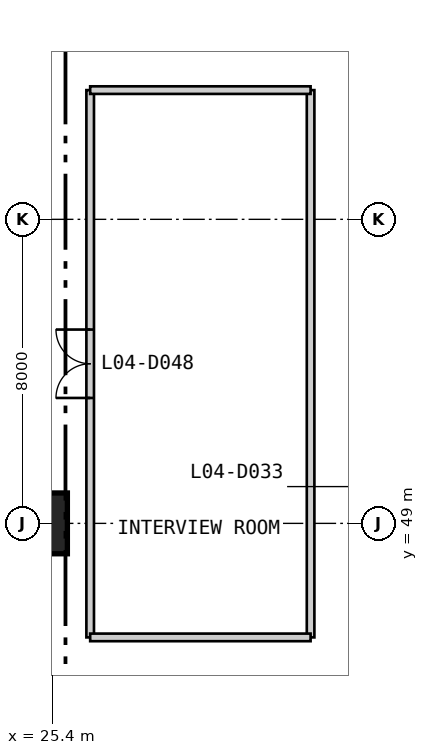
"""IFC4 building model, lengths in metres.
Left out: names, types, materials, properties, quantities, classifications, styles, units other than length and angle.
Written with IfcOpenShell. Run it as: python <this file> out.ifc"""

import sys

from ifc_helpers import new_model, si_unit, direction, frame, frame_2d, origin, origin_2d, place, context, subcontext, project, spatial, rectangle, extrude, element, fill, save


model = new_model("IFC4")
c1 = context("Model", 3, precision=1e-05, world=origin(), true_north=direction((0.0, 1.0)))
c2 = subcontext(c1, "Body", "Model", "MODEL_VIEW")
j1 = project(units=[si_unit("LENGTHUNIT", "METRE"), si_unit("PLANEANGLEUNIT", "RADIAN")], contexts=[c1])
p1 = place(None, origin())
s1 = spatial("IfcSite", under=j1, at=p1, CompositionType="ELEMENT")
p2 = place(p1, origin())
s2 = spatial("IfcBuilding", under=s1, at=p2, CompositionType="ELEMENT")
p3 = place(p2, frame((0.0, 0.0, 21.4)))
s3 = spatial("IfcBuildingStorey", under=s2, at=p3, CompositionType="ELEMENT", Elevation=21.4)
p4 = place(p3, frame((25.0, 49.0, 0.0), z_axis=(0.0, 0.0, 1.0), x_axis=(1.0, 0.0, 0.0)))
e1 = element("IfcColumn", 1, at=p4, inside=s3, PredefinedType="COLUMN", context=c2, shape_type="SweptSolid", body=[
    extrude(rectangle(XDim=1.6, YDim=1.6, at=origin_2d()), origin(), (0.0, 0.0, 1.0), 4.8),
])
p5 = place(p3, frame((26.4, 46.0, 0.0), z_axis=(0.0, 0.0, 1.0), x_axis=(0.0, 1.0, 0.0)))
e2 = element("IfcWall", 2, at=p5, inside=s3, PredefinedType="PARTITIONING", context=c2, shape_type="SweptSolid", body=[
    extrude(rectangle(XDim=14.4, YDim=0.2, at=frame_2d((7.2, 0.0))), origin(), (0.0, 0.0, 1.0), 4.5),
])
p6 = place(p5, frame((6.3, 0.0, 0.0)))
e3 = element("IfcOpeningElement", 3, at=p6, cuts=e2, PredefinedType="OPENING", context=c2, shape_type="SweptSolid", body=[
    extrude(rectangle(XDim=1.8, YDim=2.4, at=frame_2d((0.9, 1.2))), frame((0.0, 0.11, 0.0), z_axis=(0.0, -1.0, 0.0), x_axis=(1.0, 0.0, 0.0)), (0.0, 0.0, 1.0), 0.22),
])
p7 = place(p3, frame((32.2, 46.0, 0.0), z_axis=(0.0, 0.0, 1.0), x_axis=(0.0, 1.0, 0.0)))
e4 = element("IfcWall", 4, at=p7, inside=s3, PredefinedType="PARTITIONING", context=c2, shape_type="SweptSolid", body=[
    extrude(rectangle(XDim=14.4, YDim=0.2, at=frame_2d((7.2, 0.0))), origin(), (0.0, 0.0, 1.0), 4.5),
])
for number, where, z_axis, x_axis in (
    (5, (26.4, 46.0, 0.0), (0.0, 0.0, 1.0), (1.0, 0.0, 0.0)),
    (6, (26.4, 60.4, 0.0), (0.0, 0.0, 1.0), (1.0, 0.0, 0.0)),
):
    element("IfcWall", number, at=place(p3, frame(where, z_axis=z_axis, x_axis=x_axis)), inside=s3, PredefinedType="PARTITIONING", context=c2, shape_type="SweptSolid", body=[
        extrude(rectangle(XDim=5.8, YDim=0.2, at=frame_2d((2.9, 0.0))), origin(), (0.0, 0.0, 1.0), 4.5),
    ])
p8 = place(p6, origin())
e7 = element("IfcDoor", 7, at=p8, inside=s3, OperationType="DOUBLE_DOOR_SINGLE_SWING", PredefinedType="DOOR", context=c2, shape_type="SweptSolid", body=[
    extrude(rectangle(XDim=1.8, YDim=2.4, at=frame_2d((0.9, 1.2))), frame((0.0, 0.025, 0.0), z_axis=(0.0, -1.0, 0.0), x_axis=(1.0, 0.0, 0.0)), (0.0, 0.0, 1.0), 0.05),
])
fill(e3, e7)
save(model, sys.argv[1])
